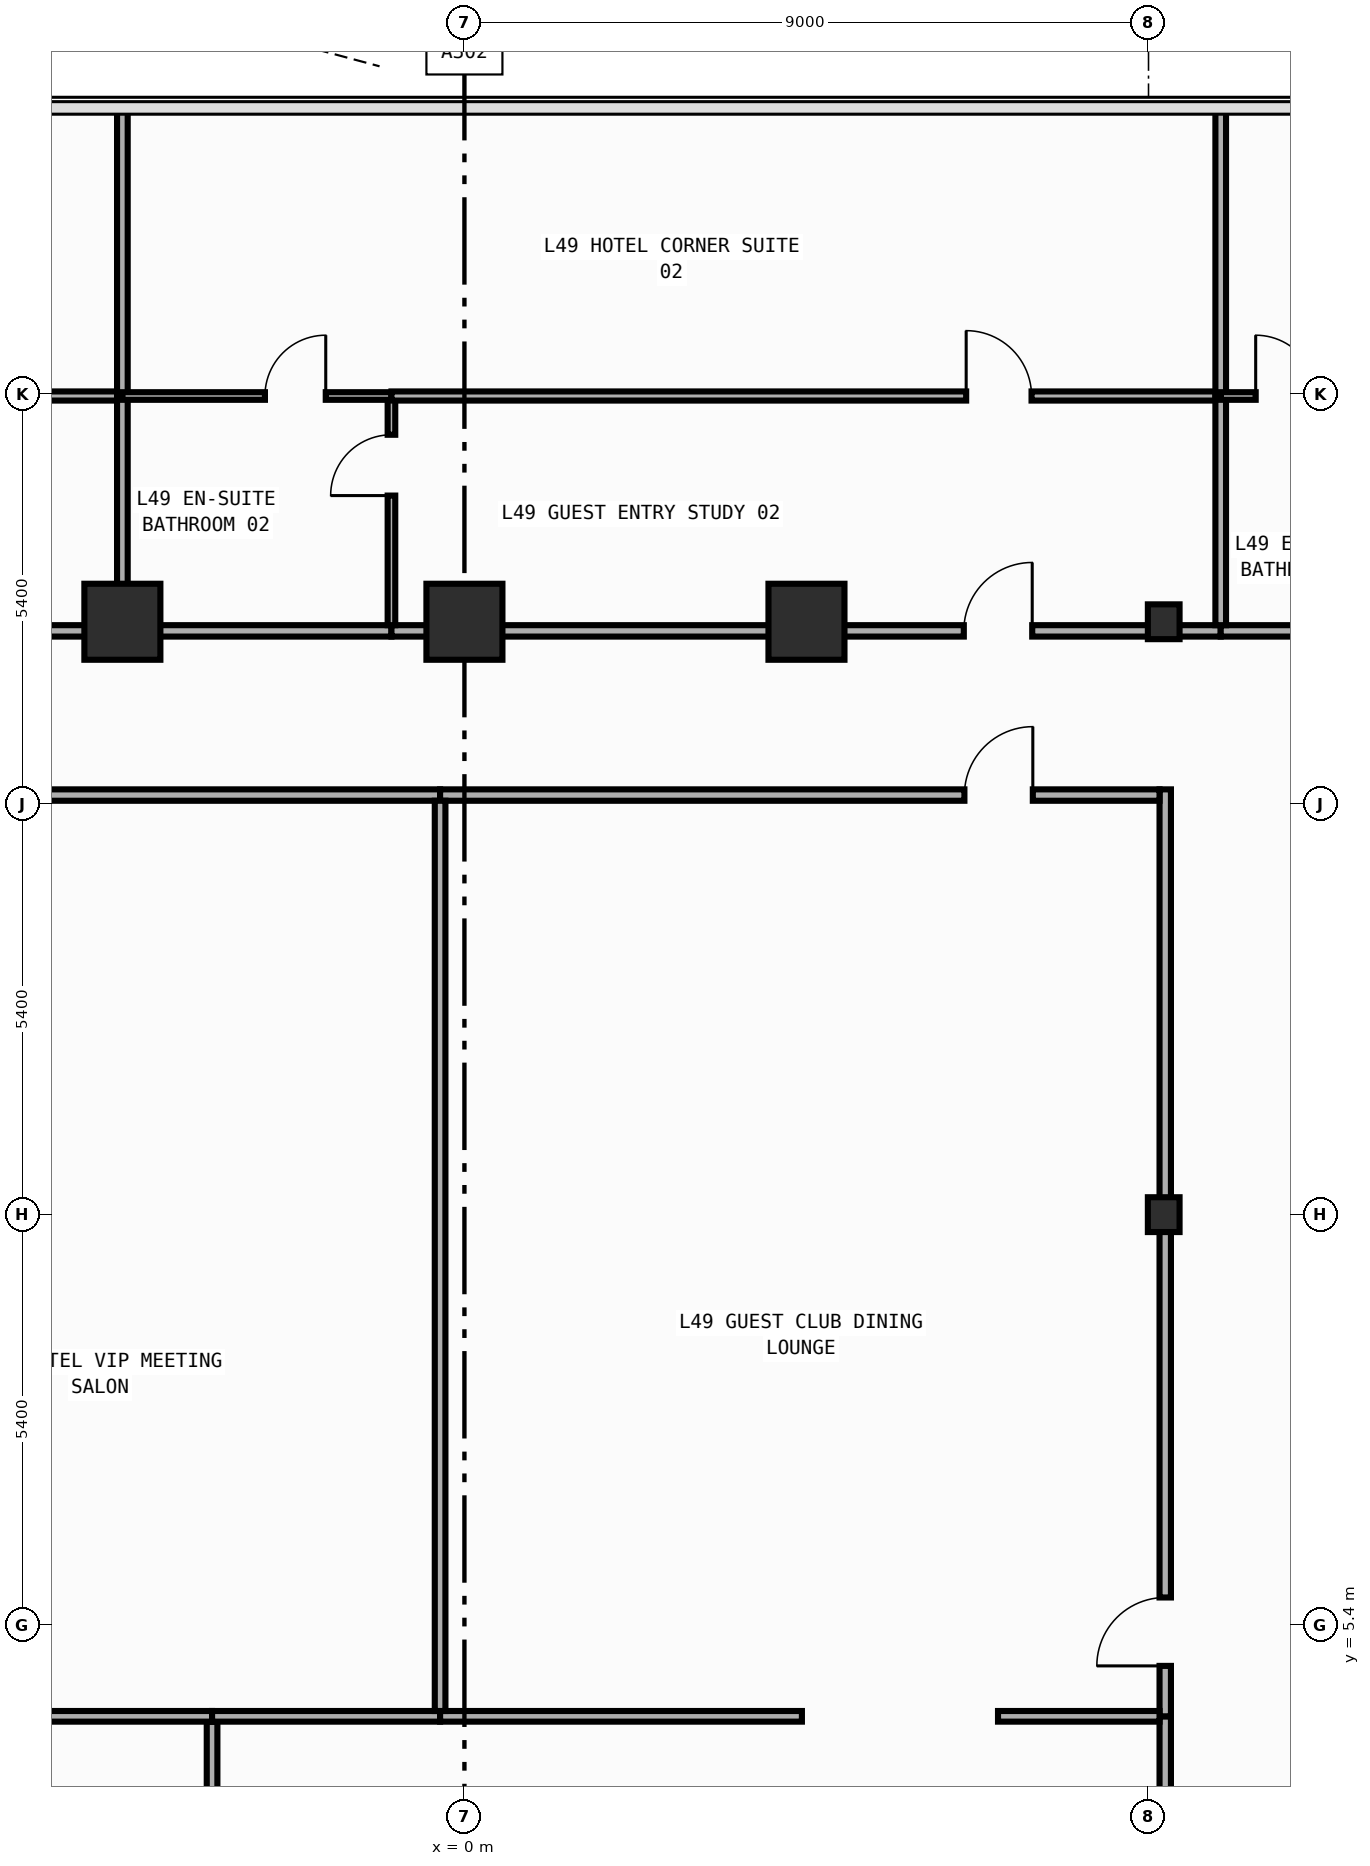
"""IFC4 building model, lengths in metres.
Left out: names, types, materials, properties, quantities, classifications, styles, units other than length and angle.
Written with IfcOpenShell. Run it as: python <this file> out.ifc"""

import sys

from ifc_helpers import new_model, si_unit, direction, frame, frame_2d, origin, origin_2d, place, context, subcontext, project, spatial, rectangle, i_section, extrude, element, fill, save


model = new_model("IFC4")
c1 = context("Model", 3, precision=1e-05, world=origin(), true_north=direction((0.0, 1.0)))
c2 = subcontext(c1, "Body", "Model", "MODEL_VIEW")
j1 = project(units=[si_unit("LENGTHUNIT", "METRE"), si_unit("PLANEANGLEUNIT", "RADIAN")], contexts=[c1])
p1 = place(None, origin())
s1 = spatial("IfcSite", under=j1, at=p1, CompositionType="ELEMENT")
p2 = place(p1, origin())
s2 = spatial("IfcBuilding", under=s1, at=p2, CompositionType="ELEMENT")
p3 = place(p2, frame((0.0, 0.0, 210.6)))
s3 = spatial("IfcBuildingStorey", under=s2, at=p3, CompositionType="ELEMENT", Elevation=210.6)
for number, where, z_axis, x_axis in (
    (1, (9.2, 10.8, 0.0), (0.0, 0.0, 1.0), (1.0, 0.0, 0.0)),
    (2, (9.2, 18.6, 0.0), (0.0, 0.0, 1.0), (1.0, 0.0, 0.0)),
):
    element("IfcColumn", number, at=place(p3, frame(where, z_axis=z_axis, x_axis=x_axis)), inside=s3, PredefinedType="COLUMN", context=c2, shape_type="SweptSolid", body=[
        extrude(i_section(OverallWidth=0.417, OverallDepth=0.458, WebThickness=0.03, FlangeThickness=0.05, FilletRadius=0.022, at=origin_2d()), origin(), (0.0, 0.0, 1.0), 3.8),
    ])
for number, where, z_axis, x_axis in (
    (3, (-4.5, 18.6, 0.0), (0.0, 0.0, 1.0), (1.0, 0.0, 0.0)),
    (4, (0.0, 18.6, 0.0), (0.0, 0.0, 1.0), (1.0, 0.0, 0.0)),
    (5, (4.5, 18.6, 0.0), (0.0, 0.0, 1.0), (1.0, 0.0, 0.0)),
):
    element("IfcColumn", number, at=place(p3, frame(where, z_axis=z_axis, x_axis=x_axis)), inside=s3, PredefinedType="COLUMN", context=c2, shape_type="SweptSolid", body=[
        extrude(rectangle(XDim=1.0, YDim=1.0, at=origin_2d()), origin(), (0.0, 0.0, 1.0), 3.8),
    ])
p4 = place(p3, frame((9.22, -15.195, 0.0), z_axis=(0.0, 0.0, 1.0), x_axis=(0.0, 1.0, 0.0)))
e6 = element("IfcWall", 6, at=p4, inside=s3, PredefinedType="PARTITIONING", context=c2, shape_type="SweptSolid", body=[
    extrude(rectangle(XDim=19.395, YDim=0.15, at=frame_2d((9.698, 0.0))), origin(), (0.0, 0.0, 1.0), 2.862),
])
p5 = place(p4, frame((9.348, 0.0, 0.0)))
e7 = element("IfcOpeningElement", 7, at=p5, cuts=e6, PredefinedType="OPENING", context=c2, shape_type="SweptSolid", body=[
    extrude(rectangle(XDim=0.9, YDim=2.15, at=frame_2d((0.45, 1.075))), frame((0.0, 0.085, 0.0), z_axis=(0.0, -1.0, 0.0), x_axis=(1.0, 0.0, 0.0)), (0.0, 0.0, 1.0), 0.17),
])
p6 = place(p3, frame((9.22, 4.2, 0.0), z_axis=(0.0, 0.0, 1.0), x_axis=(0.0, 1.0, 0.0)))
e8 = element("IfcWall", 8, at=p6, inside=s3, PredefinedType="PARTITIONING", context=c2, shape_type="SweptSolid", body=[
    extrude(rectangle(XDim=12.195, YDim=0.15, at=frame_2d((6.098, 0.0))), origin(), (0.0, 0.0, 1.0), 2.862),
])
p7 = place(p6, frame((0.663, 0.0, 0.0)))
e9 = element("IfcOpeningElement", 9, at=p7, cuts=e8, PredefinedType="OPENING", context=c2, shape_type="SweptSolid", body=[
    extrude(rectangle(XDim=0.9, YDim=2.15, at=frame_2d((0.45, 1.075))), frame((0.0, 0.085, 0.0), z_axis=(0.0, -1.0, 0.0), x_axis=(1.0, 0.0, 0.0)), (0.0, 0.0, 1.0), 0.17),
])
p8 = place(p3, frame((-9.145, 16.32, 0.0), z_axis=(0.0, 0.0, 1.0), x_axis=(1.0, 0.0, 0.0)))
e10 = element("IfcWall", 10, at=p8, inside=s3, PredefinedType="PARTITIONING", context=c2, shape_type="SweptSolid", body=[
    extrude(rectangle(XDim=8.825, YDim=0.15, at=frame_2d((4.413, 0.0))), origin(), (0.0, 0.0, 1.0), 3.45),
])
p9 = place(p8, frame((1.661, 0.0, 0.0)))
e11 = element("IfcOpeningElement", 11, at=p9, cuts=e10, PredefinedType="OPENING", context=c2, shape_type="SweptSolid", body=[
    extrude(rectangle(XDim=0.9, YDim=2.15, at=frame_2d((0.45, 1.075))), frame((0.0, 0.085, 0.0), z_axis=(0.0, -1.0, 0.0), x_axis=(1.0, 0.0, 0.0)), (0.0, 0.0, 1.0), 0.17),
])
p10 = place(p3, frame((-0.32, 16.32, 0.0), z_axis=(0.0, 0.0, 1.0), x_axis=(1.0, 0.0, 0.0)))
e12 = element("IfcWall", 12, at=p10, inside=s3, PredefinedType="PARTITIONING", context=c2, shape_type="SweptSolid", body=[
    extrude(rectangle(XDim=9.465, YDim=0.15, at=frame_2d((4.732, 0.0))), origin(), (0.0, 0.0, 1.0), 3.45),
])
p11 = place(p10, frame((6.898, 0.0, 0.0)))
e13 = element("IfcOpeningElement", 13, at=p11, cuts=e12, PredefinedType="OPENING", context=c2, shape_type="SweptSolid", body=[
    extrude(rectangle(XDim=0.9, YDim=2.15, at=frame_2d((0.45, 1.075))), frame((0.0, 0.085, 0.0), z_axis=(0.0, -1.0, 0.0), x_axis=(1.0, 0.0, 0.0)), (0.0, 0.0, 1.0), 0.17),
])
p12 = place(p3, frame((-18.26, 18.48, 0.0), z_axis=(0.0, 0.0, 1.0), x_axis=(1.0, 0.0, 0.0)))
e14 = element("IfcWall", 14, at=p12, inside=s3, PredefinedType="PARTITIONING", context=c2, shape_type="SweptSolid", body=[
    extrude(rectangle(XDim=13.76, YDim=0.15, at=frame_2d((6.88, 0.0))), origin(), (0.0, 0.0, 1.0), 2.862),
])
p13 = place(p12, frame((0.46, 0.0, 0.0)))
e15 = element("IfcOpeningElement", 15, at=p13, cuts=e14, PredefinedType="OPENING", context=c2, shape_type="SweptSolid", body=[
    extrude(rectangle(XDim=0.9, YDim=2.15, at=frame_2d((0.45, 1.075))), frame((0.0, 0.085, 0.0), z_axis=(0.0, -1.0, 0.0), x_axis=(1.0, 0.0, 0.0)), (0.0, 0.0, 1.0), 0.17),
])
p14 = place(p3, frame((-4.5, 18.48, 0.0), z_axis=(0.0, 0.0, 1.0), x_axis=(1.0, 0.0, 0.0)))
e16 = element("IfcWall", 16, at=p14, inside=s3, PredefinedType="PARTITIONING", context=c2, shape_type="SweptSolid", body=[
    extrude(rectangle(XDim=3.54, YDim=0.15, at=frame_2d((1.77, 0.0))), origin(), (0.0, 0.0, 1.0), 2.862),
])
p15 = place(p3, frame((-0.96, 18.48, 0.0), z_axis=(0.0, 0.0, 1.0), x_axis=(1.0, 0.0, 0.0)))
e17 = element("IfcWall", 17, at=p15, inside=s3, PredefinedType="PARTITIONING", context=c2, shape_type="SweptSolid", body=[
    extrude(rectangle(XDim=10.91, YDim=0.15, at=frame_2d((5.455, 0.0))), origin(), (0.0, 0.0, 1.0), 2.862),
])
p16 = place(p15, frame((7.53, 0.0, 0.0)))
e18 = element("IfcOpeningElement", 18, at=p16, cuts=e17, PredefinedType="OPENING", context=c2, shape_type="SweptSolid", body=[
    extrude(rectangle(XDim=0.9, YDim=2.15, at=frame_2d((0.45, 1.075))), frame((0.0, 0.085, 0.0), z_axis=(0.0, -1.0, 0.0), x_axis=(1.0, 0.0, 0.0)), (0.0, 0.0, 1.0), 0.17),
])
p17 = place(p3, frame((9.95, 18.48, 0.0), z_axis=(0.0, 0.0, 1.0), x_axis=(1.0, 0.0, 0.0)))
e19 = element("IfcWall", 19, at=p17, inside=s3, PredefinedType="PARTITIONING", context=c2, shape_type="SweptSolid", body=[
    extrude(rectangle(XDim=3.54, YDim=0.15, at=frame_2d((1.77, 0.0))), origin(), (0.0, 0.0, 1.0), 3.45),
])
p18 = place(p3, frame((-3.32, -15.045, 0.0), z_axis=(0.0, 0.0, 1.0), x_axis=(0.0, 1.0, 0.0)))
e20 = element("IfcWall", 20, at=p18, inside=s3, PredefinedType="PARTITIONING", context=c2, shape_type="SweptSolid", body=[
    extrude(rectangle(XDim=19.175, YDim=0.14, at=frame_2d((9.587, 0.0))), origin(), (0.0, 0.0, 1.0), 3.45),
])
p19 = place(p3, frame((-6.12, 4.2, 0.0), z_axis=(0.0, 0.0, 1.0), x_axis=(1.0, 0.0, 0.0)))
e21 = element("IfcWall", 21, at=p19, inside=s3, PredefinedType="PARTITIONING", context=c2, shape_type="SweptSolid", body=[
    extrude(rectangle(XDim=2.8, YDim=0.14, at=frame_2d((1.4, 0.0))), origin(), (0.0, 0.0, 1.0), 3.45),
])
p20 = place(p3, frame((-3.32, 4.2, 0.0), z_axis=(0.0, 0.0, 1.0), x_axis=(1.0, 0.0, 0.0)))
e22 = element("IfcWall", 22, at=p20, inside=s3, PredefinedType="PARTITIONING", context=c2, shape_type="SweptSolid", body=[
    extrude(rectangle(XDim=3.0, YDim=0.14, at=frame_2d((1.5, 0.0))), origin(), (0.0, 0.0, 1.0), 3.45),
])
p21 = place(p3, frame((-0.32, 4.2, 0.0), z_axis=(0.0, 0.0, 1.0), x_axis=(1.0, 0.0, 0.0)))
e23 = element("IfcWall", 23, at=p21, inside=s3, PredefinedType="PARTITIONING", context=c2, shape_type="SweptSolid", body=[
    extrude(rectangle(XDim=4.76, YDim=0.14, at=frame_2d((2.38, 0.0))), origin(), (0.0, 0.0, 1.0), 3.45),
])
p22 = place(p3, frame((7.02, 4.2, 0.0), z_axis=(0.0, 0.0, 1.0), x_axis=(1.0, 0.0, 0.0)))
e24 = element("IfcWall", 24, at=p22, inside=s3, PredefinedType="PARTITIONING", context=c2, shape_type="SweptSolid", body=[
    extrude(rectangle(XDim=2.125, YDim=0.14, at=frame_2d((1.062, 0.0))), origin(), (0.0, 0.0, 1.0), 3.45),
])
p23 = place(p3, frame((-0.32, 4.27, 0.0), z_axis=(0.0, 0.0, 1.0), x_axis=(0.0, 1.0, 0.0)))
e25 = element("IfcWall", 25, at=p23, inside=s3, PredefinedType="PARTITIONING", context=c2, shape_type="SweptSolid", body=[
    extrude(rectangle(XDim=11.975, YDim=0.14, at=frame_2d((5.988, 0.0))), origin(), (0.0, 0.0, 1.0), 3.45),
])
p24 = place(p3, frame((-18.26, 21.57, 0.0), z_axis=(0.0, 0.0, 1.0), x_axis=(1.0, 0.0, 0.0)))
e26 = element("IfcWall", 26, at=p24, inside=s3, PredefinedType="PARTITIONING", context=c2, shape_type="SweptSolid", body=[
    extrude(rectangle(XDim=13.76, YDim=0.12, at=frame_2d((6.88, 0.0))), origin(), (0.0, 0.0, 1.0), 3.45),
])
p25 = place(p24, frame((10.816, 0.0, 0.0)))
e27 = element("IfcOpeningElement", 27, at=p25, cuts=e26, PredefinedType="OPENING", context=c2, shape_type="SweptSolid", body=[
    extrude(rectangle(XDim=0.86, YDim=2.15, at=frame_2d((0.43, 1.075))), frame((0.0, 0.07, 0.0), z_axis=(0.0, -1.0, 0.0), x_axis=(1.0, 0.0, 0.0)), (0.0, 0.0, 1.0), 0.14),
])
p26 = place(p3, frame((-4.5, 18.555, 0.0), z_axis=(0.0, 0.0, 1.0), x_axis=(0.0, 1.0, 0.0)))
e28 = element("IfcWall", 28, at=p26, inside=s3, PredefinedType="PARTITIONING", context=c2, shape_type="SweptSolid", body=[
    extrude(rectangle(XDim=3.015, YDim=0.14, at=frame_2d((1.508, 0.0))), origin(), (0.0, 0.0, 1.0), 3.45),
])
p27 = place(p3, frame((-4.5, 21.57, 0.0), z_axis=(0.0, 0.0, 1.0), x_axis=(0.0, 1.0, 0.0)))
e29 = element("IfcWall", 29, at=p27, inside=s3, PredefinedType="PARTITIONING", context=c2, shape_type="SweptSolid", body=[
    extrude(rectangle(XDim=3.785, YDim=0.14, at=frame_2d((1.893, 0.0))), origin(), (0.0, 0.0, 1.0), 3.45),
])
p28 = place(p3, frame((-0.96, 18.555, 0.0), z_axis=(0.0, 0.0, 1.0), x_axis=(0.0, 1.0, 0.0)))
e30 = element("IfcWall", 30, at=p28, inside=s3, PredefinedType="PARTITIONING", context=c2, shape_type="SweptSolid", body=[
    extrude(rectangle(XDim=2.965, YDim=0.1, at=frame_2d((1.482, 0.0))), origin(), (0.0, 0.0, 1.0), 3.45),
])
p29 = place(p28, frame((1.705, 0.0, 0.0)))
e31 = element("IfcOpeningElement", 31, at=p29, cuts=e30, PredefinedType="OPENING", context=c2, shape_type="SweptSolid", body=[
    extrude(rectangle(XDim=0.8, YDim=2.1, at=frame_2d((0.4, 1.05))), frame((0.0, 0.06, 0.0), z_axis=(0.0, -1.0, 0.0), x_axis=(1.0, 0.0, 0.0)), (0.0, 0.0, 1.0), 0.12),
])
p30 = place(p3, frame((-4.5, 21.57, 0.0), z_axis=(0.0, 0.0, 1.0), x_axis=(1.0, 0.0, 0.0)))
e32 = element("IfcWall", 32, at=p30, inside=s3, PredefinedType="PARTITIONING", context=c2, shape_type="SweptSolid", body=[
    extrude(rectangle(XDim=3.54, YDim=0.1, at=frame_2d((1.77, 0.0))), origin(), (0.0, 0.0, 1.0), 3.45),
])
p31 = place(p30, frame((1.875, 0.0, 0.0)))
e33 = element("IfcOpeningElement", 33, at=p31, cuts=e32, PredefinedType="OPENING", context=c2, shape_type="SweptSolid", body=[
    extrude(rectangle(XDim=0.8, YDim=2.1, at=frame_2d((0.4, 1.05))), frame((0.0, 0.06, 0.0), z_axis=(0.0, -1.0, 0.0), x_axis=(1.0, 0.0, 0.0)), (0.0, 0.0, 1.0), 0.12),
])
p32 = place(p3, frame((-0.96, 21.57, 0.0), z_axis=(0.0, 0.0, 1.0), x_axis=(1.0, 0.0, 0.0)))
e34 = element("IfcWall", 34, at=p32, inside=s3, PredefinedType="PARTITIONING", context=c2, shape_type="SweptSolid", body=[
    extrude(rectangle(XDim=10.91, YDim=0.12, at=frame_2d((5.455, 0.0))), origin(), (0.0, 0.0, 1.0), 3.45),
])
p33 = place(p32, frame((7.561, 0.0, 0.0)))
e35 = element("IfcOpeningElement", 35, at=p33, cuts=e34, PredefinedType="OPENING", context=c2, shape_type="SweptSolid", body=[
    extrude(rectangle(XDim=0.86, YDim=2.15, at=frame_2d((0.43, 1.075))), frame((0.0, 0.07, 0.0), z_axis=(0.0, -1.0, 0.0), x_axis=(1.0, 0.0, 0.0)), (0.0, 0.0, 1.0), 0.14),
])
p34 = place(p3, frame((9.95, 18.555, 0.0), z_axis=(0.0, 0.0, 1.0), x_axis=(0.0, 1.0, 0.0)))
e36 = element("IfcWall", 36, at=p34, inside=s3, PredefinedType="PARTITIONING", context=c2, shape_type="SweptSolid", body=[
    extrude(rectangle(XDim=3.015, YDim=0.14, at=frame_2d((1.508, 0.0))), origin(), (0.0, 0.0, 1.0), 3.45),
])
p35 = place(p3, frame((9.95, 21.57, 0.0), z_axis=(0.0, 0.0, 1.0), x_axis=(0.0, 1.0, 0.0)))
e37 = element("IfcWall", 37, at=p35, inside=s3, PredefinedType="PARTITIONING", context=c2, shape_type="SweptSolid", body=[
    extrude(rectangle(XDim=3.785, YDim=0.14, at=frame_2d((1.893, 0.0))), origin(), (0.0, 0.0, 1.0), 3.45),
])
p36 = place(p3, frame((9.95, 21.57, 0.0), z_axis=(0.0, 0.0, 1.0), x_axis=(1.0, 0.0, 0.0)))
e38 = element("IfcWall", 38, at=p36, inside=s3, PredefinedType="PARTITIONING", context=c2, shape_type="SweptSolid", body=[
    extrude(rectangle(XDim=3.54, YDim=0.1, at=frame_2d((1.77, 0.0))), origin(), (0.0, 0.0, 1.0), 3.45),
])
p37 = place(p36, frame((0.46, 0.0, 0.0)))
e39 = element("IfcOpeningElement", 39, at=p37, cuts=e38, PredefinedType="OPENING", context=c2, shape_type="SweptSolid", body=[
    extrude(rectangle(XDim=0.8, YDim=2.1, at=frame_2d((0.4, 1.05))), frame((0.0, 0.06, 0.0), z_axis=(0.0, -1.0, 0.0), x_axis=(1.0, 0.0, 0.0)), (0.0, 0.0, 1.0), 0.12),
])
p38 = place(p7, origin())
e40 = element("IfcDoor", 40, at=p38, inside=s3, OperationType="SINGLE_SWING_LEFT", PredefinedType="DOOR", context=c2, shape_type="SweptSolid", body=[
    extrude(rectangle(XDim=0.9, YDim=2.15, at=frame_2d((0.45, 1.075))), frame((0.0, 0.025, 0.0), z_axis=(0.0, -1.0, 0.0), x_axis=(1.0, 0.0, 0.0)), (0.0, 0.0, 1.0), 0.05),
])
fill(e9, e40)
p39 = place(p11, origin())
e41 = element("IfcDoor", 41, at=p39, inside=s3, OperationType="SINGLE_SWING_RIGHT", PredefinedType="DOOR", context=c2, shape_type="SweptSolid", body=[
    extrude(rectangle(XDim=0.9, YDim=2.15, at=frame_2d((0.45, 1.075))), frame((0.0, 0.025, 0.0), z_axis=(0.0, -1.0, 0.0), x_axis=(1.0, 0.0, 0.0)), (0.0, 0.0, 1.0), 0.05),
])
fill(e13, e41)
p40 = place(p16, origin())
e42 = element("IfcDoor", 42, at=p40, inside=s3, OperationType="SINGLE_SWING_RIGHT", PredefinedType="DOOR", context=c2, shape_type="SweptSolid", body=[
    extrude(rectangle(XDim=0.9, YDim=2.15, at=frame_2d((0.45, 1.075))), frame((0.0, 0.025, 0.0), z_axis=(0.0, -1.0, 0.0), x_axis=(1.0, 0.0, 0.0)), (0.0, 0.0, 1.0), 0.05),
])
fill(e18, e42)
p41 = place(p29, origin())
e43 = element("IfcDoor", 43, at=p41, inside=s3, OperationType="SINGLE_SWING_LEFT", PredefinedType="DOOR", context=c2, shape_type="SweptSolid", body=[
    extrude(rectangle(XDim=0.8, YDim=2.1, at=frame_2d((0.4, 1.05))), frame((0.0, 0.025, 0.0), z_axis=(0.0, -1.0, 0.0), x_axis=(1.0, 0.0, 0.0)), (0.0, 0.0, 1.0), 0.05),
])
fill(e31, e43)
p42 = place(p31, origin())
e44 = element("IfcDoor", 44, at=p42, inside=s3, OperationType="SINGLE_SWING_RIGHT", PredefinedType="DOOR", context=c2, shape_type="SweptSolid", body=[
    extrude(rectangle(XDim=0.8, YDim=2.1, at=frame_2d((0.4, 1.05))), frame((0.0, 0.025, 0.0), z_axis=(0.0, -1.0, 0.0), x_axis=(1.0, 0.0, 0.0)), (0.0, 0.0, 1.0), 0.05),
])
fill(e33, e44)
p43 = place(p33, origin())
e45 = element("IfcDoor", 45, at=p43, inside=s3, OperationType="SINGLE_SWING_LEFT", PredefinedType="DOOR", context=c2, shape_type="SweptSolid", body=[
    extrude(rectangle(XDim=0.86, YDim=2.15, at=frame_2d((0.43, 1.075))), frame((0.0, 0.025, 0.0), z_axis=(0.0, -1.0, 0.0), x_axis=(1.0, 0.0, 0.0)), (0.0, 0.0, 1.0), 0.05),
])
fill(e35, e45)
p44 = place(p37, origin())
e46 = element("IfcDoor", 46, at=p44, inside=s3, OperationType="SINGLE_SWING_LEFT", PredefinedType="DOOR", context=c2, shape_type="SweptSolid", body=[
    extrude(rectangle(XDim=0.8, YDim=2.1, at=frame_2d((0.4, 1.05))), frame((0.0, 0.025, 0.0), z_axis=(0.0, -1.0, 0.0), x_axis=(1.0, 0.0, 0.0)), (0.0, 0.0, 1.0), 0.05),
])
fill(e39, e46)
save(model, sys.argv[1])
